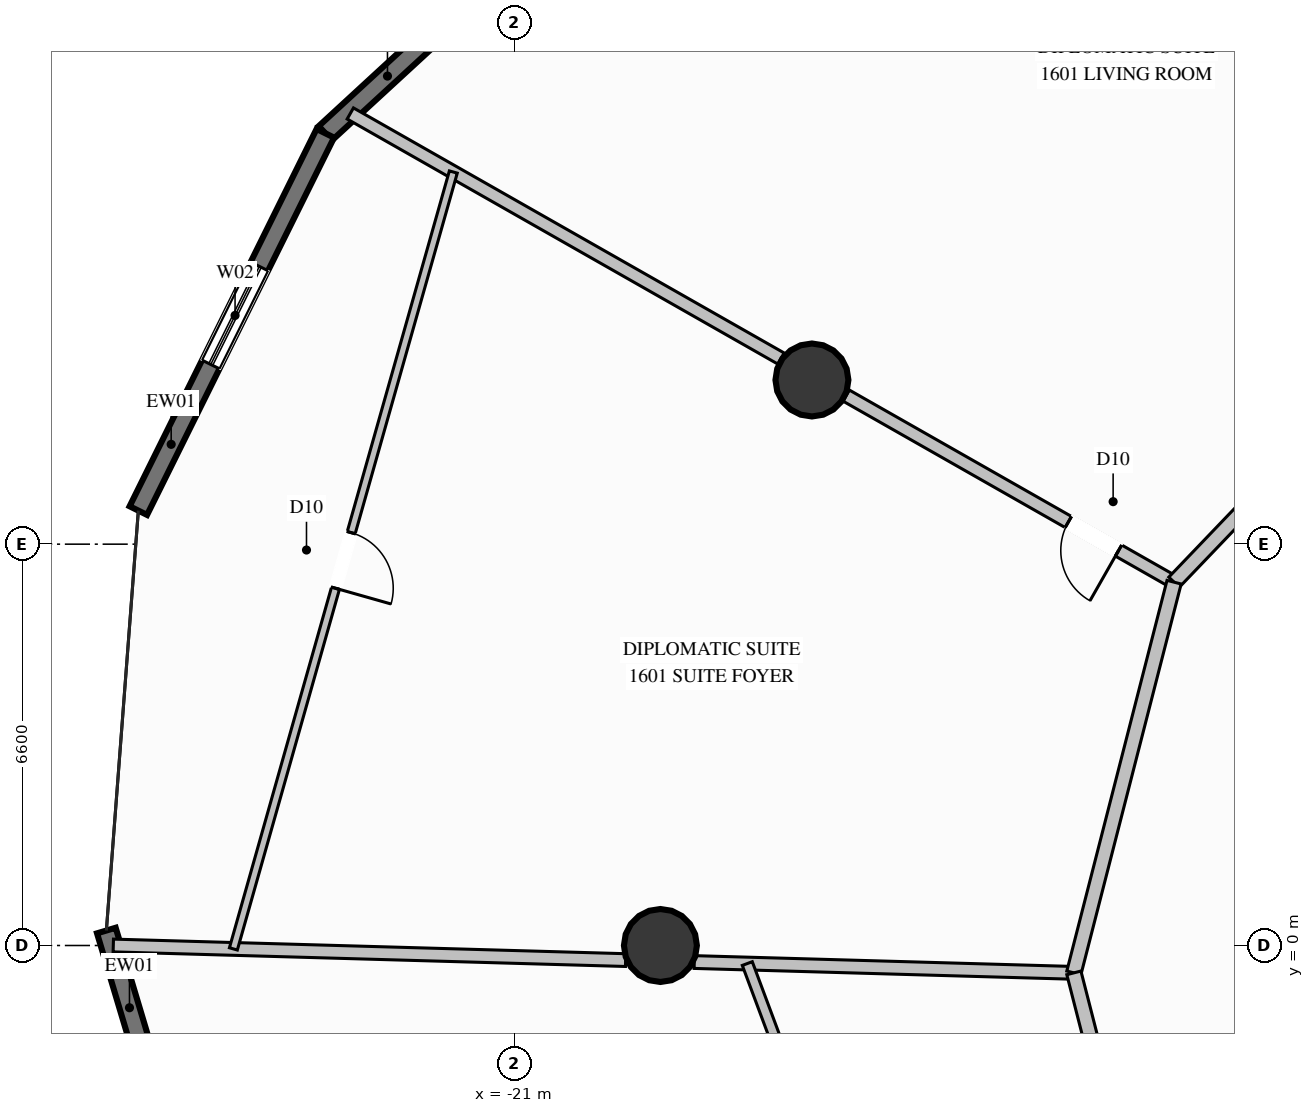
"""IFC4 building model, lengths in metres.
Left out: names, types, materials, properties, quantities, classifications, styles, units other than length and angle.
Written with IfcOpenShell. Run it as: python <this file> out.ifc"""

import sys

from ifc_helpers import new_model, si_unit, direction, frame, frame_2d, origin, origin_2d, place, context, subcontext, project, spatial, rectangle, circle, extrude, element, fill, save


model = new_model("IFC4")
c1 = context("Model", 3, precision=1e-05, world=origin(), true_north=direction((0.0, 1.0)))
c2 = subcontext(c1, "Body", "Model", "MODEL_VIEW")
j1 = project(units=[si_unit("LENGTHUNIT", "METRE"), si_unit("PLANEANGLEUNIT", "RADIAN")], contexts=[c1])
p1 = place(None, origin())
s1 = spatial("IfcSite", under=j1, at=p1, CompositionType="ELEMENT")
p2 = place(p1, origin())
s2 = spatial("IfcBuilding", under=s1, at=p2, CompositionType="ELEMENT")
p3 = place(p2, frame((0.0, 0.0, 60.8)))
s3 = spatial("IfcBuildingStorey", under=s2, at=p3, CompositionType="ELEMENT", Elevation=60.8)
for number, where, z_axis, x_axis in (
    (1, (-16.108, 9.3, 0.0), (0.0, 0.0, 1.0), (1.0, 0.0, 0.0)),
    (2, (-18.6, 0.0, 0.0), (0.0, 0.0, 1.0), (1.0, 0.0, 0.0)),
):
    element("IfcColumn", number, at=place(p3, frame(where, z_axis=z_axis, x_axis=x_axis)), inside=s3, PredefinedType="COLUMN", context=c2, shape_type="SweptSolid", body=[
        extrude(circle(Radius=0.6, at=origin_2d()), origin(), (0.0, 0.0, 1.0), 3.6),
    ])
p4 = place(p3, frame((-24.111, 13.357, 0.0), z_axis=(0.0, 0.0, 1.0), x_axis=(0.735876522022, 0.677115754016, 0.0)))
e3 = element("IfcWall", 3, at=p4, inside=s3, PredefinedType="SOLIDWALL", context=c2, shape_type="SweptSolid", body=[
    extrude(rectangle(XDim=7.234, YDim=0.32, at=frame_2d((3.617, 0.0))), origin(), (0.0, 0.0, 1.0), 3.34),
])
p5 = place(p4, frame((3.028, 0.0, 0.35)))
e4 = element("IfcOpeningElement", 4, at=p5, cuts=e3, PredefinedType="OPENING", context=c2, shape_type="SweptSolid", body=[
    extrude(rectangle(XDim=1.8, YDim=2.6, at=frame_2d((0.9, 1.3))), frame((0.0, 0.17, 0.0), z_axis=(0.0, -1.0, 0.0), x_axis=(1.0, 0.0, 0.0)), (0.0, 0.0, 1.0), 0.34),
])
p6 = place(p3, frame((-27.186, 7.152, 0.0), z_axis=(0.0, 0.0, 1.0), x_axis=(0.444037823644, 0.896008041914, 0.0)))
e5 = element("IfcWall", 5, at=p6, inside=s3, PredefinedType="SOLIDWALL", context=c2, shape_type="SweptSolid", body=[
    extrude(rectangle(XDim=6.925, YDim=0.32, at=frame_2d((3.462, 0.0))), origin(), (0.0, 0.0, 1.0), 3.34),
])
p7 = place(p6, frame((2.682, 0.0, 0.35)))
e6 = element("IfcOpeningElement", 6, at=p7, cuts=e5, PredefinedType="OPENING", context=c2, shape_type="SweptSolid", body=[
    extrude(rectangle(XDim=1.8, YDim=2.6, at=frame_2d((0.9, 1.3))), frame((0.0, 0.17, 0.0), z_axis=(0.0, -1.0, 0.0), x_axis=(1.0, 0.0, 0.0)), (0.0, 0.0, 1.0), 0.34),
])
p8 = place(p3, frame((-25.638, -6.683, 0.0), z_axis=(0.0, 0.0, 1.0), x_axis=(-0.286740873851, 0.958008179121, 0.0)))
e7 = element("IfcWall", 7, at=p8, inside=s3, PredefinedType="SOLIDWALL", context=c2, shape_type="SweptSolid", body=[
    extrude(rectangle(XDim=7.233, YDim=0.32, at=frame_2d((3.616, 0.0))), origin(), (0.0, 0.0, 1.0), 3.34),
])
p9 = place(p8, frame((2.532, 0.0, 0.35)))
e8 = element("IfcOpeningElement", 8, at=p9, cuts=e7, PredefinedType="OPENING", context=c2, shape_type="SweptSolid", body=[
    extrude(rectangle(XDim=1.8, YDim=2.6, at=frame_2d((0.9, 1.3))), frame((0.0, 0.17, 0.0), z_axis=(0.0, -1.0, 0.0), x_axis=(1.0, 0.0, 0.0)), (0.0, 0.0, 1.0), 0.34),
])
p10 = place(p3, frame((-10.152, 5.975, 0.0), z_axis=(0.0, 0.0, 1.0), x_axis=(-0.869157123992, 0.494536038944, 0.0)))
e9 = element("IfcWall", 9, at=p10, inside=s3, PredefinedType="PARTITIONING", context=c2, shape_type="SweptSolid", body=[
    extrude(rectangle(XDim=6.204, YDim=0.21, at=frame_2d((3.102, 0.0))), origin(), (0.0, 0.0, 1.0), 2.709),
])
p11 = place(p10, frame((1.051, 0.0, 0.0)))
e10 = element("IfcOpeningElement", 10, at=p11, cuts=e9, PredefinedType="OPENING", context=c2, shape_type="SweptSolid", body=[
    extrude(rectangle(XDim=0.95, YDim=2.1, at=frame_2d((0.475, 1.05))), frame((0.0, 0.115, 0.0), z_axis=(0.0, -1.0, 0.0), x_axis=(1.0, 0.0, 0.0)), (0.0, 0.0, 1.0), 0.23),
])
p12 = place(p3, frame((-16.617, 9.653, 0.0), z_axis=(0.0, 0.0, 1.0), x_axis=(-0.869161611856, 0.494528151348, 0.0)))
e11 = element("IfcWall", 11, at=p12, inside=s3, PredefinedType="PARTITIONING", context=c2, shape_type="SweptSolid", body=[
    extrude(rectangle(XDim=8.149, YDim=0.21, at=frame_2d((4.075, 0.0))), origin(), (0.0, 0.0, 1.0), 3.34),
])
p13 = place(p3, frame((-11.8, -0.45, 0.0), z_axis=(0.0, 0.0, 1.0), x_axis=(-0.999593870063, 0.02849727939, 0.0)))
e12 = element("IfcWall", 12, at=p13, inside=s3, PredefinedType="PARTITIONING", context=c2, shape_type="SweptSolid", body=[
    extrude(rectangle(XDim=6.245, YDim=0.21, at=frame_2d((3.123, 0.0))), origin(), (0.0, 0.0, 1.0), 2.709),
])
p14 = place(p3, frame((-19.172, -0.24, 0.0), z_axis=(0.0, 0.0, 1.0), x_axis=(-0.999594610371, 0.028471299896, 0.0)))
e13 = element("IfcWall", 13, at=p14, inside=s3, PredefinedType="PARTITIONING", context=c2, shape_type="SweptSolid", body=[
    extrude(rectangle(XDim=8.429, YDim=0.21, at=frame_2d((4.215, 0.0))), origin(), (0.0, 0.0, 1.0), 3.34),
])
p15 = place(p3, frame((-5.65, 10.678, 0.0), z_axis=(0.0, 0.0, 1.0), x_axis=(-0.691526541012, -0.72235105252, 0.0)))
e14 = element("IfcWall", 14, at=p15, inside=s3, PredefinedType="PARTITIONING", context=c2, shape_type="SweptSolid", body=[
    extrude(rectangle(XDim=6.51, YDim=0.24, at=frame_2d((3.255, 0.0))), origin(), (0.0, 0.0, 1.0), 3.34),
])
p16 = place(p3, frame((-10.152, 5.975, 0.0), z_axis=(0.0, 0.0, 1.0), x_axis=(-0.248446193127, -0.968645698447, 0.0)))
e15 = element("IfcWall", 15, at=p16, inside=s3, PredefinedType="PARTITIONING", context=c2, shape_type="SweptSolid", body=[
    extrude(rectangle(XDim=6.633, YDim=0.24, at=frame_2d((3.316, 0.0))), origin(), (0.0, 0.0, 1.0), 3.34),
])
p17 = place(p3, frame((-22.006, 12.72, 0.0), z_axis=(0.0, 0.0, 1.0), x_axis=(-0.272401157448, -0.962183771127, 0.0)))
e16 = element("IfcWall", 16, at=p17, inside=s3, PredefinedType="PARTITIONING", context=c2, shape_type="SweptSolid", body=[
    extrude(rectangle(XDim=13.278, YDim=0.135, at=frame_2d((6.639, 0.0))), origin(), (0.0, 0.0, 1.0), 3.34),
])
p18 = place(p17, frame((6.164, 0.0, 0.0)))
e17 = element("IfcOpeningElement", 17, at=p18, cuts=e16, PredefinedType="OPENING", context=c2, shape_type="SweptSolid", body=[
    extrude(rectangle(XDim=0.95, YDim=2.1, at=frame_2d((0.475, 1.05))), frame((0.0, 0.078, 0.0), z_axis=(0.0, -1.0, 0.0), x_axis=(1.0, 0.0, 0.0)), (0.0, 0.0, 1.0), 0.155),
])
p19 = place(p3, frame((-11.8, -0.45, 0.0), z_axis=(0.0, 0.0, 1.0), x_axis=(0.248491333658, -0.968634119313, 0.0)))
e18 = element("IfcWall", 18, at=p19, inside=s3, PredefinedType="PARTITIONING", context=c2, shape_type="SweptSolid", body=[
    extrude(rectangle(XDim=2.785, YDim=0.24, at=frame_2d((1.393, 0.0))), origin(), (0.0, 0.0, 1.0), 3.34),
])
p20 = place(p3, frame((-17.171, -0.297, 0.0), z_axis=(0.0, 0.0, 1.0), x_axis=(0.349550044584, -0.936917694534, 0.0)))
e19 = element("IfcWall", 19, at=p20, inside=s3, PredefinedType="PLUMBINGWALL", context=c2, shape_type="SweptSolid", body=[
    extrude(rectangle(XDim=3.793, YDim=0.175, at=frame_2d((1.896, 0.0))), origin(), (0.0, 0.0, 1.0), 3.34),
])
p21 = place(p7, origin())
e20 = element("IfcWindow", 20, at=p21, inside=s3, PartitioningType="SINGLE_PANEL", PredefinedType="WINDOW", context=c2, shape_type="SweptSolid", body=[
    extrude(rectangle(XDim=1.8, YDim=2.6, at=frame_2d((0.9, 1.3))), frame((0.0, 0.03, 0.0), z_axis=(0.0, -1.0, 0.0), x_axis=(1.0, 0.0, 0.0)), (0.0, 0.0, 1.0), 0.06),
])
fill(e6, e20)
p22 = place(p11, origin())
e21 = element("IfcDoor", 21, at=p22, inside=s3, OperationType="SINGLE_SWING_LEFT", PredefinedType="DOOR", context=c2, shape_type="SweptSolid", body=[
    extrude(rectangle(XDim=0.95, YDim=2.1, at=frame_2d((0.475, 1.05))), frame((0.0, 0.025, 0.0), z_axis=(0.0, -1.0, 0.0), x_axis=(1.0, 0.0, 0.0)), (0.0, 0.0, 1.0), 0.05),
])
fill(e10, e21)
p23 = place(p18, origin())
e22 = element("IfcDoor", 22, at=p23, inside=s3, OperationType="SINGLE_SWING_RIGHT", PredefinedType="DOOR", context=c2, shape_type="SweptSolid", body=[
    extrude(rectangle(XDim=0.95, YDim=2.1, at=frame_2d((0.475, 1.05))), frame((0.0, 0.025, 0.0), z_axis=(0.0, -1.0, 0.0), x_axis=(1.0, 0.0, 0.0)), (0.0, 0.0, 1.0), 0.05),
])
fill(e17, e22)
save(model, sys.argv[1])
